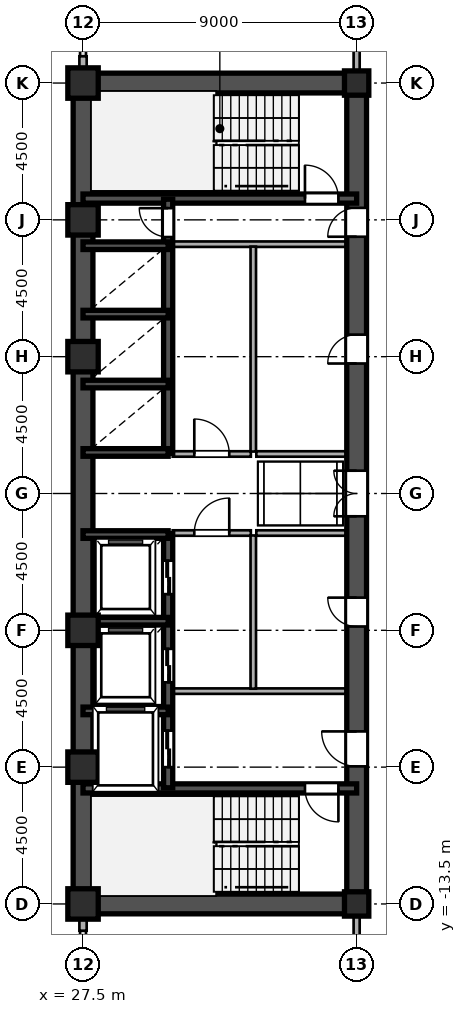
"""IFC4 building model, lengths in metres.
Left out: names, types, materials, properties, quantities, classifications, styles, units other than length and angle.
Written with IfcOpenShell. Run it as: python <this file> out.ifc"""

import sys

from ifc_helpers import new_model, si_unit, direction, frame, frame_2d, origin, origin_2d, place, context, subcontext, project, spatial, rectangle, hollow_rectangle, i_section, extrude, source, transform, mapped, element, fill, save


model = new_model("IFC4")
c1 = context("Model", 3, precision=1e-05, world=origin(), true_north=direction((0.0, 1.0)))
c2 = subcontext(c1, "Body", "Model", "MODEL_VIEW")
j1 = project(units=[si_unit("LENGTHUNIT", "METRE"), si_unit("PLANEANGLEUNIT", "RADIAN")], contexts=[c1])
p1 = place(None, origin())
s1 = spatial("IfcSite", under=j1, at=p1, CompositionType="ELEMENT")
p2 = place(p1, origin())
s2 = spatial("IfcBuilding", under=s1, at=p2, CompositionType="ELEMENT")
p3 = place(p2, frame((0.0, 0.0, 62.1)))
s3 = spatial("IfcBuildingStorey", under=s2, at=p3, CompositionType="ELEMENT", Elevation=62.1)
m1 = source(origin(), c2, "Body", "SweptSolid", [
    extrude(hollow_rectangle(XDim=1.0, YDim=1.0, WallThickness=0.042, at=origin_2d()), origin(), (0.0, 0.0, 1.0), 3.6),
])
for number, where, z_axis, x_axis in (
    (1, (27.5, -13.5, 0.0), (0.0, 0.0, 1.0), (1.0, 0.0, 0.0)),
    (2, (27.5, -9.0, 0.0), (0.0, 0.0, 1.0), (1.0, 0.0, 0.0)),
    (3, (27.5, -4.5, 0.0), (0.0, 0.0, 1.0), (1.0, 0.0, 0.0)),
    (4, (27.5, 4.5, 0.0), (0.0, 0.0, 1.0), (1.0, 0.0, 0.0)),
    (5, (27.5, 9.0, 0.0), (0.0, 0.0, 1.0), (1.0, 0.0, 0.0)),
    (6, (27.5, 13.5, 0.0), (0.0, 0.0, 1.0), (1.0, 0.0, 0.0)),
):
    element("IfcColumn", number, at=place(p3, frame(where, z_axis=z_axis, x_axis=x_axis)), inside=s3, PredefinedType="COLUMN", context=c2, shape_type="MappedRepresentation", body=[
        mapped(m1, transform((0.0, 0.0, 0.0), scale=1.0)),
    ])
m2 = source(origin(), c2, "Body", "SweptSolid", [
    extrude(i_section(OverallWidth=0.8, OverallDepth=0.8, WebThickness=0.032, FlangeThickness=0.05, at=origin_2d()), origin(), (0.0, 0.0, 1.0), 3.6),
])
for number, where, z_axis, x_axis in (
    (7, (36.5, -13.5, 0.0), (0.0, 0.0, 1.0), (1.0, 0.0, 0.0)),
    (8, (36.5, 13.5, 0.0), (0.0, 0.0, 1.0), (1.0, 0.0, 0.0)),
):
    element("IfcColumn", number, at=place(p3, frame(where, z_axis=z_axis, x_axis=x_axis)), inside=s3, PredefinedType="COLUMN", context=c2, shape_type="MappedRepresentation", body=[
        mapped(m2, transform((0.0, 0.0, 0.0), scale=1.0)),
    ])
for number, where, z_axis, x_axis in (
    (9, (27.5, -14.38, 0.0), (0.0, 0.0, 1.0), (0.0, 1.0, 0.0)),
    (10, (27.5, 13.83, 0.0), (0.0, 0.0, 1.0), (0.0, 1.0, 0.0)),
):
    element("IfcWall", number, at=place(p3, frame(where, z_axis=z_axis, x_axis=x_axis)), inside=s3, PredefinedType="SOLIDWALL", context=c2, shape_type="SweptSolid", body=[
        extrude(rectangle(XDim=0.55, YDim=0.24, at=frame_2d((0.275, 0.0))), origin(), (0.0, 0.0, 1.0), 2.88),
    ])
for number, where, z_axis, x_axis in (
    (11, (27.5, -13.5, 0.0), (0.0, 0.0, 1.0), (0.0, 1.0, 0.0)),
    (12, (27.5, 1.3, 0.0), (0.0, 0.0, 1.0), (0.0, 1.0, 0.0)),
):
    element("IfcWall", number, at=place(p3, frame(where, z_axis=z_axis, x_axis=x_axis)), inside=s3, PredefinedType="SHEAR", context=c2, shape_type="SweptSolid", body=[
        extrude(rectangle(XDim=12.2, YDim=0.65, at=frame_2d((6.1, 0.0))), origin(), (0.0, 0.0, 1.0), 3.38),
    ])
p4 = place(p3, frame((27.5, -1.3, 0.0), z_axis=(0.0, 0.0, 1.0), x_axis=(0.0, 1.0, 0.0)))
e13 = element("IfcWall", 13, at=p4, inside=s3, PredefinedType="SHEAR", context=c2, shape_type="SweptSolid", body=[
    extrude(rectangle(XDim=2.6, YDim=0.65, at=frame_2d((1.3, 0.0))), origin(), (0.0, 0.0, 1.0), 3.38),
])
for number, where, z_axis, x_axis in (
    (14, (27.5, -13.5, 0.0), (0.0, 0.0, 1.0), (1.0, 0.0, 0.0)),
    (15, (27.5, 13.5, 0.0), (0.0, 0.0, 1.0), (1.0, 0.0, 0.0)),
):
    element("IfcWall", number, at=place(p3, frame(where, z_axis=z_axis, x_axis=x_axis)), inside=s3, PredefinedType="SHEAR", context=c2, shape_type="SweptSolid", body=[
        extrude(rectangle(XDim=9.0, YDim=0.65, at=frame_2d((4.5, 0.0))), origin(), (0.0, 0.0, 1.0), 3.38),
    ])
p5 = place(p3, frame((36.5, -13.65, 0.0), z_axis=(0.0, 0.0, 1.0), x_axis=(0.0, 1.0, 0.0)))
e16 = element("IfcWall", 16, at=p5, inside=s3, PredefinedType="SHEAR", context=c2, shape_type="SweptSolid", body=[
    extrude(rectangle(XDim=7.15, YDim=0.65, at=frame_2d((3.575, 0.0))), origin(), (0.0, 0.0, 1.0), 3.38),
])
p6 = place(p5, frame((4.675, 0.0, 0.0)))
e17 = element("IfcOpeningElement", 17, at=p6, cuts=e16, PredefinedType="OPENING", context=c2, shape_type="SweptSolid", body=[
    extrude(rectangle(XDim=1.15, YDim=2.2, at=frame_2d((0.575, 1.1))), frame((0.0, 0.335, 0.0), z_axis=(0.0, -1.0, 0.0), x_axis=(1.0, 0.0, 0.0)), (0.0, 0.0, 1.0), 0.67),
])
p7 = place(p3, frame((36.5, -1.3, 0.0), z_axis=(0.0, 0.0, 1.0), x_axis=(0.0, 1.0, 0.0)))
e18 = element("IfcWall", 18, at=p7, inside=s3, PredefinedType="SHEAR", context=c2, shape_type="SweptSolid", body=[
    extrude(rectangle(XDim=2.6, YDim=0.65, at=frame_2d((1.3, 0.0))), origin(), (0.0, 0.0, 1.0), 3.38),
])
p8 = place(p7, frame((0.55, 0.0, 0.0)))
e19 = element("IfcOpeningElement", 19, at=p8, cuts=e18, PredefinedType="OPENING", context=c2, shape_type="SweptSolid", body=[
    extrude(rectangle(XDim=1.5, YDim=2.3, at=frame_2d((0.75, 1.15))), frame((0.0, 0.335, 0.0), z_axis=(0.0, -1.0, 0.0), x_axis=(1.0, 0.0, 0.0)), (0.0, 0.0, 1.0), 0.67),
])
p9 = place(p3, frame((36.5, 8.2, 0.0), z_axis=(0.0, 0.0, 1.0), x_axis=(0.0, 1.0, 0.0)))
e20 = element("IfcWall", 20, at=p9, inside=s3, PredefinedType="SHEAR", context=c2, shape_type="SweptSolid", body=[
    extrude(rectangle(XDim=5.45, YDim=0.65, at=frame_2d((2.725, 0.0))), origin(), (0.0, 0.0, 1.0), 3.38),
])
p10 = place(p9, frame((0.245, 0.0, 0.0)))
e21 = element("IfcOpeningElement", 21, at=p10, cuts=e20, PredefinedType="OPENING", context=c2, shape_type="SweptSolid", body=[
    extrude(rectangle(XDim=0.95, YDim=2.15, at=frame_2d((0.475, 1.075))), frame((0.0, 0.335, 0.0), z_axis=(0.0, -1.0, 0.0), x_axis=(1.0, 0.0, 0.0)), (0.0, 0.0, 1.0), 0.67),
])
p11 = place(p3, frame((36.5, -6.5, 0.0), z_axis=(0.0, 0.0, 1.0), x_axis=(0.0, 1.0, 0.0)))
e22 = element("IfcWall", 22, at=p11, inside=s3, PredefinedType="SHEAR", context=c2, shape_type="SweptSolid", body=[
    extrude(rectangle(XDim=5.2, YDim=0.65, at=frame_2d((2.6, 0.0))), origin(), (0.0, 0.0, 1.0), 3.38),
])
p12 = place(p11, frame((2.125, 0.0, 0.0)))
e23 = element("IfcOpeningElement", 23, at=p12, cuts=e22, PredefinedType="OPENING", context=c2, shape_type="SweptSolid", body=[
    extrude(rectangle(XDim=0.95, YDim=2.15, at=frame_2d((0.475, 1.075))), frame((0.0, 0.335, 0.0), z_axis=(0.0, -1.0, 0.0), x_axis=(1.0, 0.0, 0.0)), (0.0, 0.0, 1.0), 0.67),
])
p13 = place(p3, frame((36.5, 1.3, 0.0), z_axis=(0.0, 0.0, 1.0), x_axis=(0.0, 1.0, 0.0)))
e24 = element("IfcWall", 24, at=p13, inside=s3, PredefinedType="SHEAR", context=c2, shape_type="SweptSolid", body=[
    extrude(rectangle(XDim=6.9, YDim=0.65, at=frame_2d((3.45, 0.0))), origin(), (0.0, 0.0, 1.0), 3.38),
])
p14 = place(p13, frame((2.975, 0.0, 0.0)))
e25 = element("IfcOpeningElement", 25, at=p14, cuts=e24, PredefinedType="OPENING", context=c2, shape_type="SweptSolid", body=[
    extrude(rectangle(XDim=0.95, YDim=2.15, at=frame_2d((0.475, 1.075))), frame((0.0, 0.335, 0.0), z_axis=(0.0, -1.0, 0.0), x_axis=(1.0, 0.0, 0.0)), (0.0, 0.0, 1.0), 0.67),
])
p15 = place(p3, frame((27.5, -9.7, 0.0), z_axis=(0.0, 0.0, 1.0), x_axis=(1.0, 0.0, 0.0)))
e26 = element("IfcWall", 26, at=p15, inside=s3, PredefinedType="SHEAR", context=c2, shape_type="SweptSolid", body=[
    extrude(rectangle(XDim=9.0, YDim=0.3, at=frame_2d((4.5, 0.0))), origin(), (0.0, 0.0, 1.0), 3.38),
])
p16 = place(p15, frame((7.3, 0.0, 0.0)))
e27 = element("IfcOpeningElement", 27, at=p16, cuts=e26, PredefinedType="OPENING", context=c2, shape_type="SweptSolid", body=[
    extrude(rectangle(XDim=1.1, YDim=2.2, at=frame_2d((0.55, 1.1))), frame((0.0, 0.16, 0.0), z_axis=(0.0, -1.0, 0.0), x_axis=(1.0, 0.0, 0.0)), (0.0, 0.0, 1.0), 0.32),
])
p17 = place(p3, frame((27.5, 9.7, 0.0), z_axis=(0.0, 0.0, 1.0), x_axis=(1.0, 0.0, 0.0)))
e28 = element("IfcWall", 28, at=p17, inside=s3, PredefinedType="SHEAR", context=c2, shape_type="SweptSolid", body=[
    extrude(rectangle(XDim=9.0, YDim=0.3, at=frame_2d((4.5, 0.0))), origin(), (0.0, 0.0, 1.0), 3.38),
])
p18 = place(p17, frame((7.3, 0.0, 0.0)))
e29 = element("IfcOpeningElement", 29, at=p18, cuts=e28, PredefinedType="OPENING", context=c2, shape_type="SweptSolid", body=[
    extrude(rectangle(XDim=1.1, YDim=2.2, at=frame_2d((0.55, 1.1))), frame((0.0, 0.16, 0.0), z_axis=(0.0, -1.0, 0.0), x_axis=(1.0, 0.0, 0.0)), (0.0, 0.0, 1.0), 0.32),
])
for number, where, z_axis, x_axis in (
    (30, (27.5, -7.15, 0.0), (0.0, 0.0, 1.0), (1.0, 0.0, 0.0)),
    (31, (27.5, -4.2, 0.0), (0.0, 0.0, 1.0), (1.0, 0.0, 0.0)),
    (32, (27.5, -1.35, 0.0), (0.0, 0.0, 1.0), (1.0, 0.0, 0.0)),
    (33, (27.5, 1.35, 0.0), (0.0, 0.0, 1.0), (1.0, 0.0, 0.0)),
    (34, (27.5, 3.6, 0.0), (0.0, 0.0, 1.0), (1.0, 0.0, 0.0)),
    (35, (27.5, 5.9, 0.0), (0.0, 0.0, 1.0), (1.0, 0.0, 0.0)),
    (36, (27.5, 8.15, 0.0), (0.0, 0.0, 1.0), (1.0, 0.0, 0.0)),
):
    element("IfcWall", number, at=place(p3, frame(where, z_axis=z_axis, x_axis=x_axis)), inside=s3, PredefinedType="SHEAR", context=c2, shape_type="SweptSolid", body=[
        extrude(rectangle(XDim=2.8, YDim=0.25, at=frame_2d((1.4, 0.0))), origin(), (0.0, 0.0, 1.0), 3.38),
    ])
p19 = place(p3, frame((30.3, -9.68, 0.0), z_axis=(0.0, 0.0, 1.0), x_axis=(0.0, 1.0, 0.0)))
e37 = element("IfcWall", 37, at=p19, inside=s3, PredefinedType="SHEAR", context=c2, shape_type="SweptSolid", body=[
    extrude(rectangle(XDim=2.56, YDim=0.3, at=frame_2d((1.28, 0.0))), origin(), (0.0, 0.0, 1.0), 3.38),
])
p20 = place(p19, frame((0.68, 0.0, 0.0)))
e38 = element("IfcOpeningElement", 38, at=p20, cuts=e37, PredefinedType="OPENING", context=c2, shape_type="SweptSolid", body=[
    extrude(rectangle(XDim=1.2, YDim=2.25, at=frame_2d((0.6, 1.125))), frame((0.0, 0.16, 0.0), z_axis=(0.0, -1.0, 0.0), x_axis=(1.0, 0.0, 0.0)), (0.0, 0.0, 1.0), 0.32),
])
p21 = place(p3, frame((30.3, -7.12, 0.0), z_axis=(0.0, 0.0, 1.0), x_axis=(0.0, 1.0, 0.0)))
e39 = element("IfcWall", 39, at=p21, inside=s3, PredefinedType="SHEAR", context=c2, shape_type="SweptSolid", body=[
    extrude(rectangle(XDim=2.92, YDim=0.3, at=frame_2d((1.46, 0.0))), origin(), (0.0, 0.0, 1.0), 3.38),
])
p22 = place(p21, frame((0.91, 0.0, 0.0)))
e40 = element("IfcOpeningElement", 40, at=p22, cuts=e39, PredefinedType="OPENING", context=c2, shape_type="SweptSolid", body=[
    extrude(rectangle(XDim=1.1, YDim=2.2, at=frame_2d((0.55, 1.1))), frame((0.0, 0.16, 0.0), z_axis=(0.0, -1.0, 0.0), x_axis=(1.0, 0.0, 0.0)), (0.0, 0.0, 1.0), 0.32),
])
p23 = place(p3, frame((30.3, -4.2, 0.0), z_axis=(0.0, 0.0, 1.0), x_axis=(0.0, 1.0, 0.0)))
e41 = element("IfcWall", 41, at=p23, inside=s3, PredefinedType="SHEAR", context=c2, shape_type="SweptSolid", body=[
    extrude(rectangle(XDim=2.88, YDim=0.3, at=frame_2d((1.44, 0.0))), origin(), (0.0, 0.0, 1.0), 3.38),
])
p24 = place(p23, frame((0.89, 0.0, 0.0)))
e42 = element("IfcOpeningElement", 42, at=p24, cuts=e41, PredefinedType="OPENING", context=c2, shape_type="SweptSolid", body=[
    extrude(rectangle(XDim=1.1, YDim=2.2, at=frame_2d((0.55, 1.1))), frame((0.0, 0.16, 0.0), z_axis=(0.0, -1.0, 0.0), x_axis=(1.0, 0.0, 0.0)), (0.0, 0.0, 1.0), 0.32),
])
p25 = place(p3, frame((30.3, 1.32, 0.0), z_axis=(0.0, 0.0, 1.0), x_axis=(0.0, 1.0, 0.0)))
e43 = element("IfcWall", 43, at=p25, inside=s3, PredefinedType="SHEAR", context=c2, shape_type="SweptSolid", body=[
    extrude(rectangle(XDim=2.28, YDim=0.3, at=frame_2d((1.14, 0.0))), origin(), (0.0, 0.0, 1.0), 3.38),
])
p26 = place(p3, frame((30.3, 3.6, 0.0), z_axis=(0.0, 0.0, 1.0), x_axis=(0.0, 1.0, 0.0)))
e44 = element("IfcWall", 44, at=p26, inside=s3, PredefinedType="SHEAR", context=c2, shape_type="SweptSolid", body=[
    extrude(rectangle(XDim=2.3, YDim=0.3, at=frame_2d((1.15, 0.0))), origin(), (0.0, 0.0, 1.0), 3.38),
])
p27 = place(p3, frame((30.3, 5.9, 0.0), z_axis=(0.0, 0.0, 1.0), x_axis=(0.0, 1.0, 0.0)))
e45 = element("IfcWall", 45, at=p27, inside=s3, PredefinedType="SHEAR", context=c2, shape_type="SweptSolid", body=[
    extrude(rectangle(XDim=2.25, YDim=0.3, at=frame_2d((1.125, 0.0))), origin(), (0.0, 0.0, 1.0), 3.38),
])
p28 = place(p3, frame((30.3, 8.15, 0.0), z_axis=(0.0, 0.0, 1.0), x_axis=(0.0, 1.0, 0.0)))
e46 = element("IfcWall", 46, at=p28, inside=s3, PredefinedType="SHEAR", context=c2, shape_type="SweptSolid", body=[
    extrude(rectangle(XDim=1.53, YDim=0.3, at=frame_2d((0.765, 0.0))), origin(), (0.0, 0.0, 1.0), 3.38),
])
p29 = place(p28, frame((0.285, 0.0, 0.0)))
e47 = element("IfcOpeningElement", 47, at=p29, cuts=e46, PredefinedType="OPENING", context=c2, shape_type="SweptSolid", body=[
    extrude(rectangle(XDim=0.95, YDim=2.15, at=frame_2d((0.475, 1.075))), frame((0.0, 0.16, 0.0), z_axis=(0.0, -1.0, 0.0), x_axis=(1.0, 0.0, 0.0)), (0.0, 0.0, 1.0), 0.32),
])
for number, where, z_axis, x_axis in (
    (48, (30.45, -6.5, 0.0), (0.0, 0.0, 1.0), (1.0, 0.0, 0.0)),
    (49, (30.45, 8.2, 0.0), (0.0, 0.0, 1.0), (1.0, 0.0, 0.0)),
):
    element("IfcWall", number, at=place(p3, frame(where, z_axis=z_axis, x_axis=x_axis)), inside=s3, PredefinedType="PARTITIONING", context=c2, shape_type="SweptSolid", body=[
        extrude(rectangle(XDim=5.7, YDim=0.18, at=frame_2d((2.85, 0.0))), origin(), (0.0, 0.0, 1.0), 3.38),
    ])
p30 = place(p3, frame((33.1, -6.42, 0.0), z_axis=(0.0, 0.0, 1.0), x_axis=(0.0, 1.0, 0.0)))
e50 = element("IfcWall", 50, at=p30, inside=s3, PredefinedType="PARTITIONING", context=c2, shape_type="SweptSolid", body=[
    extrude(rectangle(XDim=5.04, YDim=0.18, at=frame_2d((2.52, 0.0))), origin(), (0.0, 0.0, 1.0), 3.38),
])
p31 = place(p3, frame((33.1, 1.38, 0.0), z_axis=(0.0, 0.0, 1.0), x_axis=(0.0, 1.0, 0.0)))
e51 = element("IfcWall", 51, at=p31, inside=s3, PredefinedType="PARTITIONING", context=c2, shape_type="SweptSolid", body=[
    extrude(rectangle(XDim=6.74, YDim=0.18, at=frame_2d((3.37, 0.0))), origin(), (0.0, 0.0, 1.0), 3.38),
])
p32 = place(p3, frame((30.45, -1.3, 0.0), z_axis=(0.0, 0.0, 1.0), x_axis=(1.0, 0.0, 0.0)))
e52 = element("IfcWall", 52, at=p32, inside=s3, PredefinedType="PARTITIONING", context=c2, shape_type="SweptSolid", body=[
    extrude(rectangle(XDim=2.57, YDim=0.18, at=frame_2d((1.285, 0.0))), origin(), (0.0, 0.0, 1.0), 3.38),
])
p33 = place(p32, frame((0.71, 0.0, 0.0)))
e53 = element("IfcOpeningElement", 53, at=p33, cuts=e52, PredefinedType="OPENING", context=c2, shape_type="SweptSolid", body=[
    extrude(rectangle(XDim=1.15, YDim=2.2, at=frame_2d((0.575, 1.1))), frame((0.0, 0.1, 0.0), z_axis=(0.0, -1.0, 0.0), x_axis=(1.0, 0.0, 0.0)), (0.0, 0.0, 1.0), 0.2),
])
p34 = place(p3, frame((30.45, 1.3, 0.0), z_axis=(0.0, 0.0, 1.0), x_axis=(1.0, 0.0, 0.0)))
e54 = element("IfcWall", 54, at=p34, inside=s3, PredefinedType="PARTITIONING", context=c2, shape_type="SweptSolid", body=[
    extrude(rectangle(XDim=2.57, YDim=0.18, at=frame_2d((1.285, 0.0))), origin(), (0.0, 0.0, 1.0), 3.38),
])
p35 = place(p34, frame((0.71, 0.0, 0.0)))
e55 = element("IfcOpeningElement", 55, at=p35, cuts=e54, PredefinedType="OPENING", context=c2, shape_type="SweptSolid", body=[
    extrude(rectangle(XDim=1.15, YDim=2.2, at=frame_2d((0.575, 1.1))), frame((0.0, 0.1, 0.0), z_axis=(0.0, -1.0, 0.0), x_axis=(1.0, 0.0, 0.0)), (0.0, 0.0, 1.0), 0.2),
])
for number, where, z_axis, x_axis in (
    (56, (33.2, -1.3, 0.0), (0.0, 0.0, 1.0), (1.0, 0.0, 0.0)),
    (57, (33.2, 1.3, 0.0), (0.0, 0.0, 1.0), (1.0, 0.0, 0.0)),
):
    element("IfcWall", number, at=place(p3, frame(where, z_axis=z_axis, x_axis=x_axis)), inside=s3, PredefinedType="PARTITIONING", context=c2, shape_type="SweptSolid", body=[
        extrude(rectangle(XDim=2.95, YDim=0.18, at=frame_2d((1.475, 0.0))), origin(), (0.0, 0.0, 1.0), 3.38),
    ])
for number, where, z_axis, x_axis in (
    (58, (36.5, -15.515, 0.0), (0.0, 0.0, 1.0), (0.0, 1.0, 0.0)),
    (59, (36.5, 13.83, 0.0), (0.0, 0.0, 1.0), (0.0, 1.0, 0.0)),
):
    element("IfcWall", number, at=place(p3, frame(where, z_axis=z_axis, x_axis=x_axis)), inside=s3, PredefinedType="PARTITIONING", context=c2, shape_type="SweptSolid", body=[
        extrude(rectangle(XDim=1.685, YDim=0.2, at=frame_2d((0.842, 0.0))), origin(), (0.0, 0.0, 1.0), 2.68),
    ])
m3 = source(origin(), c2, "Body", "SweptSolid", [
    extrude(rectangle(XDim=1.15, YDim=2.2, at=frame_2d((0.575, 1.1))), frame((0.0, 0.025, 0.0), z_axis=(0.0, -1.0, 0.0), x_axis=(1.0, 0.0, 0.0)), (0.0, 0.0, 1.0), 0.05),
])
p36 = place(p6, origin())
e60 = element("IfcDoor", 60, at=p36, inside=s3, OperationType="SINGLE_SWING_RIGHT", PredefinedType="DOOR", context=c2, shape_type="MappedRepresentation", body=[
    mapped(m3, transform((0.0, 0.0, 0.0), scale=1.0)),
])
fill(e17, e60)
m4 = source(origin(), c2, "Body", "SweptSolid", [
    extrude(rectangle(XDim=1.5, YDim=2.3, at=frame_2d((0.75, 1.15))), frame((0.0, 0.025, 0.0), z_axis=(0.0, -1.0, 0.0), x_axis=(1.0, 0.0, 0.0)), (0.0, 0.0, 1.0), 0.05),
])
p37 = place(p8, origin())
e61 = element("IfcDoor", 61, at=p37, inside=s3, OperationType="DOUBLE_SWING_LEFT", PredefinedType="DOOR", context=c2, shape_type="MappedRepresentation", body=[
    mapped(m4, transform((0.0, 0.0, 0.0), scale=1.0)),
])
fill(e19, e61)
m5 = source(origin(), c2, "Body", "SweptSolid", [
    extrude(rectangle(XDim=0.95, YDim=2.15, at=frame_2d((0.475, 1.075))), frame((0.0, 0.025, 0.0), z_axis=(0.0, -1.0, 0.0), x_axis=(1.0, 0.0, 0.0)), (0.0, 0.0, 1.0), 0.05),
])
p38 = place(p10, origin())
e62 = element("IfcDoor", 62, at=p38, inside=s3, OperationType="SINGLE_SWING_LEFT", PredefinedType="DOOR", context=c2, shape_type="MappedRepresentation", body=[
    mapped(m5, transform((0.0, 0.0, 0.0), scale=1.0)),
])
fill(e21, e62)
p39 = place(p12, origin())
e63 = element("IfcDoor", 63, at=p39, inside=s3, OperationType="SINGLE_SWING_RIGHT", PredefinedType="DOOR", context=c2, shape_type="MappedRepresentation", body=[
    mapped(m5, transform((0.0, 0.0, 0.0), scale=1.0)),
])
fill(e23, e63)
p40 = place(p14, origin())
e64 = element("IfcDoor", 64, at=p40, inside=s3, OperationType="SINGLE_SWING_LEFT", PredefinedType="DOOR", context=c2, shape_type="MappedRepresentation", body=[
    mapped(m5, transform((0.0, 0.0, 0.0), scale=1.0)),
])
fill(e25, e64)
m6 = source(origin(), c2, "Body", "SweptSolid", [
    extrude(rectangle(XDim=1.1, YDim=2.2, at=frame_2d((0.55, 1.1))), frame((0.0, 0.025, 0.0), z_axis=(0.0, -1.0, 0.0), x_axis=(1.0, 0.0, 0.0)), (0.0, 0.0, 1.0), 0.05),
])
p41 = place(p16, frame((1.1, 0.0, 0.0), z_axis=(0.0, 0.0, 1.0), x_axis=(-1.0, 0.0, 0.0)))
e65 = element("IfcDoor", 65, at=p41, inside=s3, OperationType="SINGLE_SWING_RIGHT", PredefinedType="DOOR", context=c2, shape_type="MappedRepresentation", body=[
    mapped(m6, transform((0.0, 0.0, 0.0), scale=1.0)),
])
fill(e27, e65)
p42 = place(p18, origin())
e66 = element("IfcDoor", 66, at=p42, inside=s3, OperationType="SINGLE_SWING_LEFT", PredefinedType="DOOR", context=c2, shape_type="MappedRepresentation", body=[
    mapped(m6, transform((0.0, 0.0, 0.0), scale=1.0)),
])
fill(e29, e66)
m7 = source(origin(), c2, "Body", "SweptSolid", [
    extrude(rectangle(XDim=1.2, YDim=2.25, at=frame_2d((0.6, 1.125))), frame((0.0, 0.025, 0.0), z_axis=(0.0, -1.0, 0.0), x_axis=(1.0, 0.0, 0.0)), (0.0, 0.0, 1.0), 0.05),
])
p43 = place(p20, origin())
e67 = element("IfcDoor", 67, at=p43, inside=s3, OperationType="DOUBLE_DOOR_SLIDING", PredefinedType="DOOR", context=c2, shape_type="MappedRepresentation", body=[
    mapped(m7, transform((0.0, 0.0, 0.0), scale=1.0)),
])
fill(e38, e67)
m8 = source(origin(), c2, "Body", "SweptSolid", [
    extrude(rectangle(XDim=1.1, YDim=2.2, at=frame_2d((0.55, 1.1))), frame((0.0, 0.025, 0.0), z_axis=(0.0, -1.0, 0.0), x_axis=(1.0, 0.0, 0.0)), (0.0, 0.0, 1.0), 0.05),
])
p44 = place(p22, origin())
e68 = element("IfcDoor", 68, at=p44, inside=s3, OperationType="DOUBLE_DOOR_SLIDING", PredefinedType="DOOR", context=c2, shape_type="MappedRepresentation", body=[
    mapped(m8, transform((0.0, 0.0, 0.0), scale=1.0)),
])
fill(e40, e68)
p45 = place(p24, origin())
e69 = element("IfcDoor", 69, at=p45, inside=s3, OperationType="DOUBLE_DOOR_SLIDING", PredefinedType="DOOR", context=c2, shape_type="MappedRepresentation", body=[
    mapped(m8, transform((0.0, 0.0, 0.0), scale=1.0)),
])
fill(e42, e69)
p46 = place(p29, origin())
e70 = element("IfcDoor", 70, at=p46, inside=s3, OperationType="SINGLE_SWING_RIGHT", PredefinedType="DOOR", context=c2, shape_type="MappedRepresentation", body=[
    mapped(m5, transform((0.0, 0.0, 0.0), scale=1.0)),
])
fill(e47, e70)
p47 = place(p33, origin())
e71 = element("IfcDoor", 71, at=p47, inside=s3, OperationType="SINGLE_SWING_RIGHT", PredefinedType="DOOR", context=c2, shape_type="MappedRepresentation", body=[
    mapped(m3, transform((0.0, 0.0, 0.0), scale=1.0)),
])
fill(e53, e71)
p48 = place(p35, origin())
e72 = element("IfcDoor", 72, at=p48, inside=s3, OperationType="SINGLE_SWING_LEFT", PredefinedType="DOOR", context=c2, shape_type="MappedRepresentation", body=[
    mapped(m3, transform((0.0, 0.0, 0.0), scale=1.0)),
])
fill(e55, e72)
save(model, sys.argv[1])
